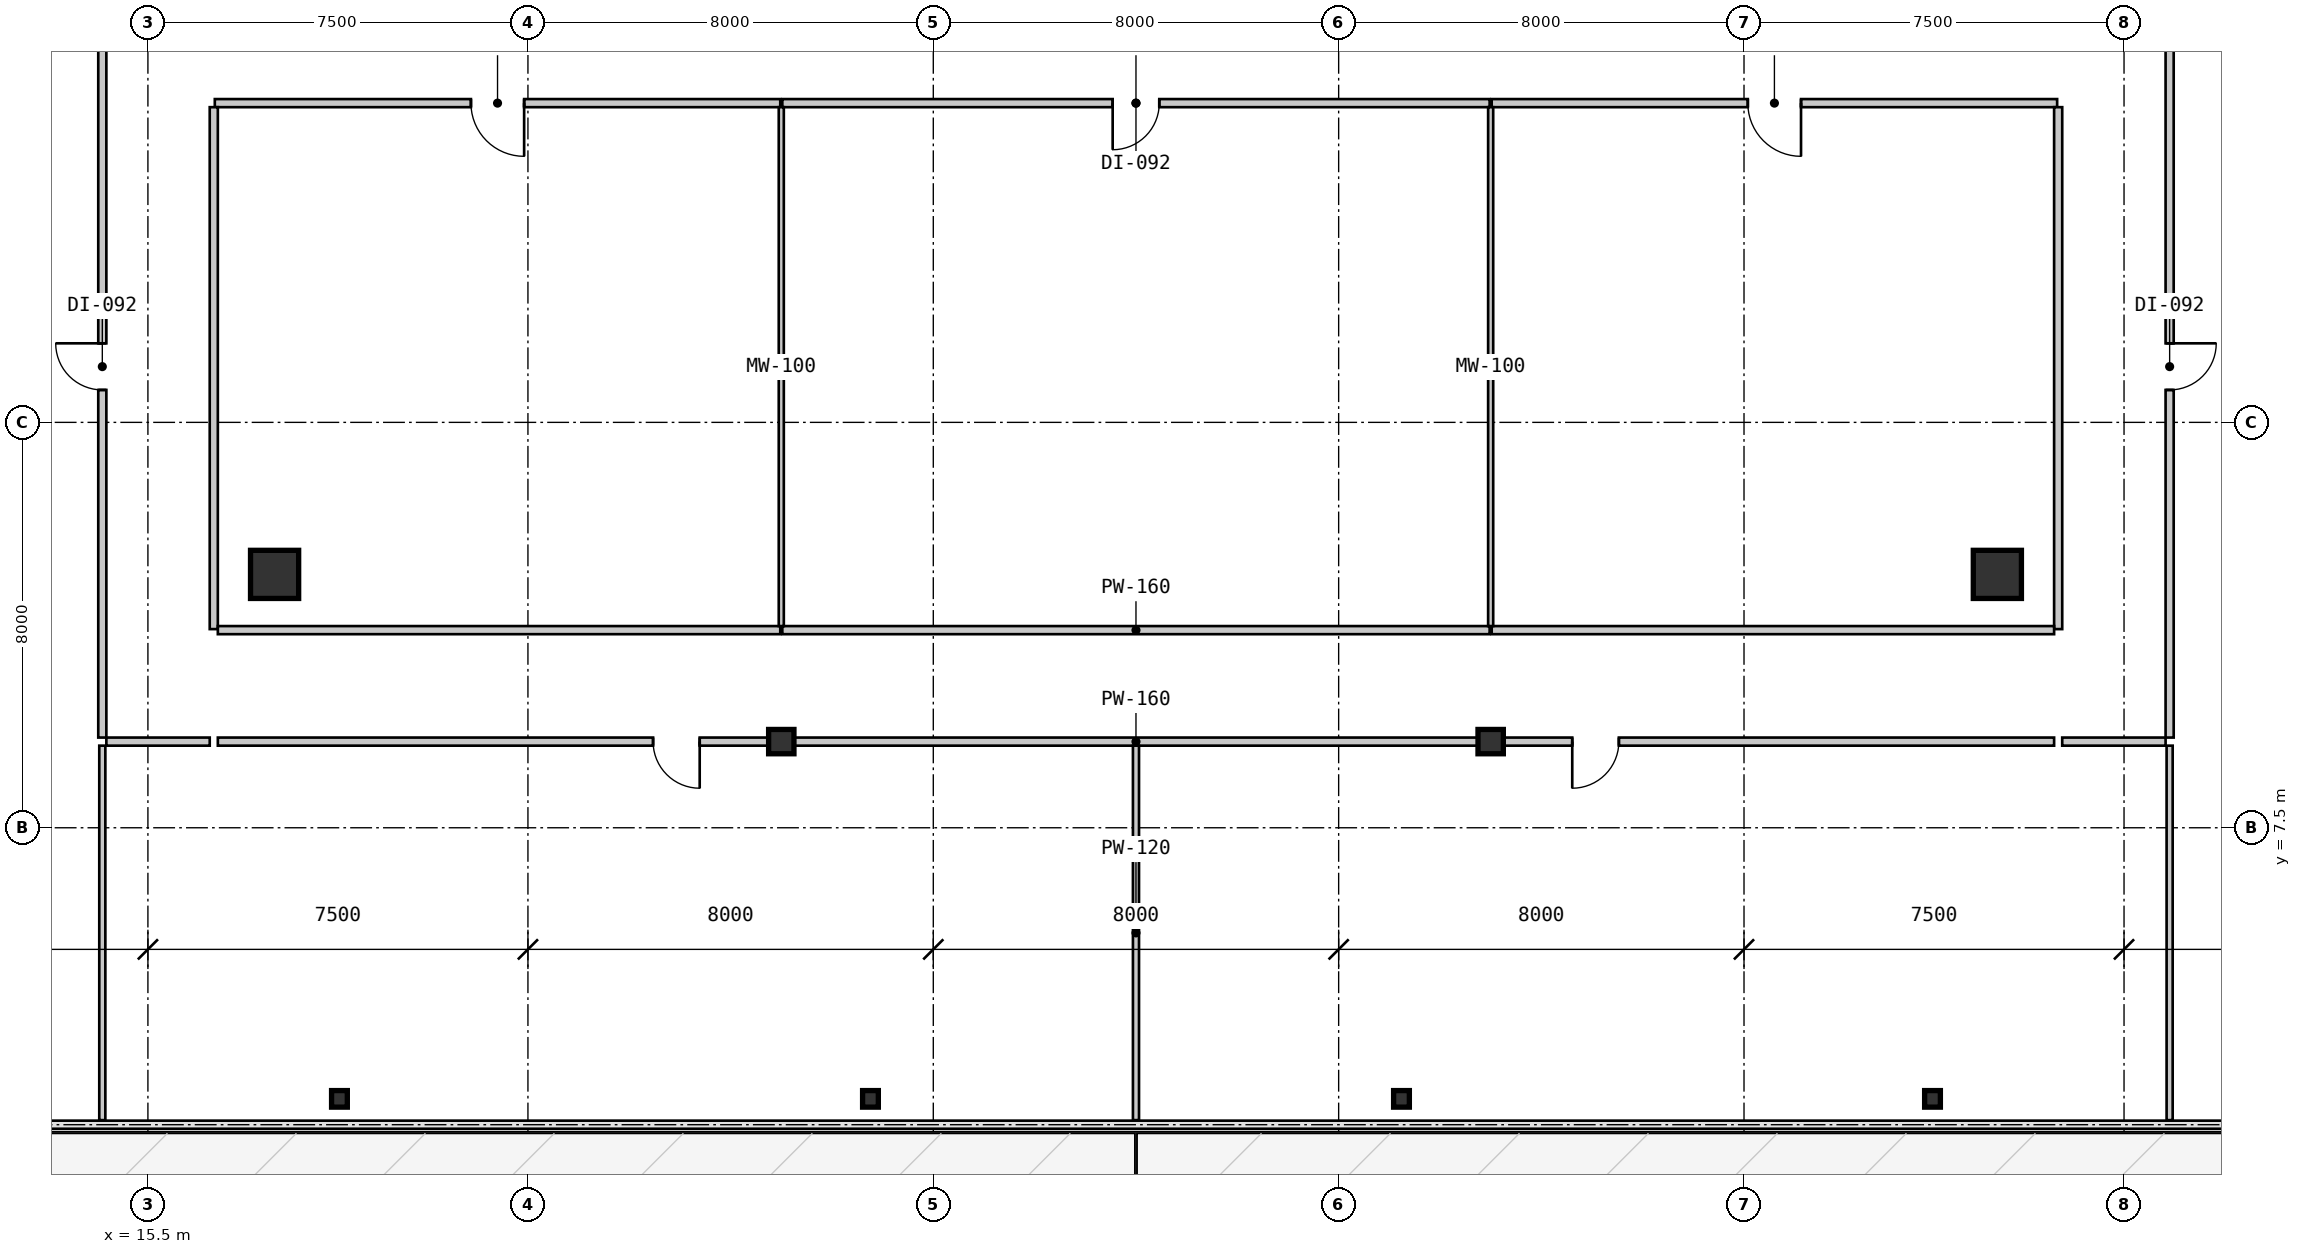
"""IFC4 building model, lengths in metres.
Left out: names, types, materials, properties, quantities, classifications, styles, units other than length and angle.
Written with IfcOpenShell. Run it as: python <this file> out.ifc"""

import sys

from ifc_helpers import new_model, si_unit, direction, frame, frame_2d, origin, origin_2d, place, context, subcontext, project, spatial, rectangle, i_section, extrude, source, transform, mapped, element, fill, save


model = new_model("IFC4")
c1 = context("Model", 3, precision=1e-05, world=origin(), true_north=direction((0.0, 1.0)))
c2 = subcontext(c1, "Body", "Model", "MODEL_VIEW")
j1 = project(units=[si_unit("LENGTHUNIT", "METRE"), si_unit("PLANEANGLEUNIT", "RADIAN")], contexts=[c1])
p1 = place(None, origin())
s1 = spatial("IfcSite", under=j1, at=p1, CompositionType="ELEMENT")
p2 = place(p1, origin())
s2 = spatial("IfcBuilding", under=s1, at=p2, CompositionType="ELEMENT")
p3 = place(p2, frame((0.0, 0.0, 16.8)))
s3 = spatial("IfcBuildingStorey", under=s2, at=p3, CompositionType="ELEMENT", Elevation=16.8)
m1 = source(origin(), c2, "Body", "SweptSolid", [
    extrude(i_section(OverallWidth=0.5, OverallDepth=0.48, WebThickness=0.028, FlangeThickness=0.044, at=origin_2d()), origin(), (0.0, 0.0, 1.0), 3.15),
])
for number, where, z_axis, x_axis in (
    (1, (28.0, 9.2, 0.0), (0.0, 0.0, 1.0), (1.0, 0.0, 0.0)),
    (2, (42.0, 9.2, 0.0), (0.0, 0.0, 1.0), (1.0, 0.0, 0.0)),
):
    element("IfcColumn", number, at=place(p3, frame(where, z_axis=z_axis, x_axis=x_axis)), inside=s3, PredefinedType="COLUMN", context=c2, shape_type="MappedRepresentation", body=[
        mapped(m1, transform((0.0, 0.0, 0.0), scale=1.0)),
    ])
m2 = source(origin(), c2, "Body", "SweptSolid", [
    extrude(rectangle(XDim=0.95, YDim=0.95, at=origin_2d()), origin(), (0.0, 0.0, 1.0), 3.15),
])
for number, where, z_axis, x_axis in (
    (3, (18.0, 12.5, 0.0), (0.0, 0.0, 1.0), (1.0, 0.0, 0.0)),
    (4, (52.0, 12.5, 0.0), (0.0, 0.0, 1.0), (1.0, 0.0, 0.0)),
):
    element("IfcColumn", number, at=place(p3, frame(where, z_axis=z_axis, x_axis=x_axis)), inside=s3, PredefinedType="COLUMN", context=c2, shape_type="MappedRepresentation", body=[
        mapped(m2, transform((0.0, 0.0, 0.0), scale=1.0)),
    ])
m3 = source(origin(), c2, "Body", "SweptSolid", [
    extrude(i_section(OverallWidth=0.311, OverallDepth=0.327, WebThickness=0.016, FlangeThickness=0.025, at=origin_2d()), origin(), (0.0, 0.0, 1.0), 3.15),
])
for number, where, z_axis, x_axis in (
    (5, (19.28, 2.15, 0.0), (0.0, 0.0, 1.0), (1.0, 0.0, 0.0)),
    (6, (29.76, 2.15, 0.0), (0.0, 0.0, 1.0), (1.0, 0.0, 0.0)),
    (7, (40.24, 2.15, 0.0), (0.0, 0.0, 1.0), (1.0, 0.0, 0.0)),
    (8, (50.72, 2.15, 0.0), (0.0, 0.0, 1.0), (1.0, 0.0, 0.0)),
):
    element("IfcColumn", number, at=place(p3, frame(where, z_axis=z_axis, x_axis=x_axis)), inside=s3, PredefinedType="COLUMN", context=c2, shape_type="MappedRepresentation", body=[
        mapped(m3, transform((0.0, 0.0, 0.0), scale=1.0)),
    ])
m4 = source(origin(), c2, "Body", "SweptSolid", [
    extrude(rectangle(XDim=11.159, YDim=0.16, at=frame_2d((5.58, 0.0))), origin(), (0.0, 0.0, 1.0), 2.93),
])
p4 = place(p3, frame((27.98, 21.8, 0.0), z_axis=(0.0, 0.0, 1.0), x_axis=(-1.0, 0.0, 0.0)))
e9 = element("IfcWall", 9, at=p4, inside=s3, PredefinedType="PARTITIONING", context=c2, shape_type="MappedRepresentation", body=[
    mapped(m4, transform((0.0, 0.0, 0.0), scale=1.0)),
])
m5 = source(origin(), c2, "Body", "SweptSolid", [
    extrude(rectangle(XDim=1.05, YDim=2.1, at=frame_2d((0.525, 1.05))), frame((0.0, 0.09, 0.0), z_axis=(0.0, -1.0, 0.0), x_axis=(1.0, 0.0, 0.0)), (0.0, 0.0, 1.0), 0.18),
])
p5 = place(p4, frame((5.055, 0.0, 0.0)))
e10 = element("IfcOpeningElement", 10, at=p5, cuts=e9, PredefinedType="OPENING", context=c2, shape_type="MappedRepresentation", body=[
    mapped(m5, transform((0.0, 0.0, 0.0), scale=1.0)),
])
m6 = source(origin(), c2, "Body", "SweptSolid", [
    extrude(rectangle(XDim=10.3, YDim=0.16, at=frame_2d((5.15, 0.0))), origin(), (0.0, 0.0, 1.0), 2.93),
])
p6 = place(p3, frame((16.8, 21.72, 0.0), z_axis=(0.0, 0.0, 1.0), x_axis=(0.0, -1.0, 0.0)))
e11 = element("IfcWall", 11, at=p6, inside=s3, PredefinedType="PARTITIONING", context=c2, shape_type="MappedRepresentation", body=[
    mapped(m6, transform((0.0, 0.0, 0.0), scale=1.0)),
])
m7 = source(origin(), c2, "Body", "SweptSolid", [
    extrude(rectangle(XDim=13.959, YDim=0.16, at=frame_2d((6.98, 0.0))), origin(), (0.0, 0.0, 1.0), 2.93),
])
p7 = place(p3, frame((41.98, 21.8, 0.0), z_axis=(0.0, 0.0, 1.0), x_axis=(-1.0, 0.0, 0.0)))
e12 = element("IfcWall", 12, at=p7, inside=s3, PredefinedType="PARTITIONING", context=c2, shape_type="MappedRepresentation", body=[
    mapped(m7, transform((0.0, 0.0, 0.0), scale=1.0)),
])
m8 = source(origin(), c2, "Body", "SweptSolid", [
    extrude(rectangle(XDim=0.92, YDim=2.1, at=frame_2d((0.46, 1.05))), frame((0.0, 0.09, 0.0), z_axis=(0.0, -1.0, 0.0), x_axis=(1.0, 0.0, 0.0)), (0.0, 0.0, 1.0), 0.18),
])
p8 = place(p7, frame((6.52, 0.0, 0.0)))
e13 = element("IfcOpeningElement", 13, at=p8, cuts=e12, PredefinedType="OPENING", context=c2, shape_type="MappedRepresentation", body=[
    mapped(m8, transform((0.0, 0.0, 0.0), scale=1.0)),
])
p9 = place(p3, frame((53.18, 21.8, 0.0), z_axis=(0.0, 0.0, 1.0), x_axis=(-1.0, 0.0, 0.0)))
e14 = element("IfcWall", 14, at=p9, inside=s3, PredefinedType="PARTITIONING", context=c2, shape_type="MappedRepresentation", body=[
    mapped(m4, transform((0.0, 0.0, 0.0), scale=1.0)),
])
p10 = place(p9, frame((5.055, 0.0, 0.0)))
e15 = element("IfcOpeningElement", 15, at=p10, cuts=e14, PredefinedType="OPENING", context=c2, shape_type="MappedRepresentation", body=[
    mapped(m5, transform((0.0, 0.0, 0.0), scale=1.0)),
])
p11 = place(p3, frame((53.2, 11.42, 0.0), z_axis=(0.0, 0.0, 1.0), x_axis=(0.0, 1.0, 0.0)))
e16 = element("IfcWall", 16, at=p11, inside=s3, PredefinedType="PARTITIONING", context=c2, shape_type="MappedRepresentation", body=[
    mapped(m6, transform((0.0, 0.0, 0.0), scale=1.0)),
])
m9 = source(origin(), c2, "Body", "SweptSolid", [
    extrude(rectangle(XDim=2.04, YDim=0.16, at=frame_2d((1.02, 0.0))), origin(), (0.0, 0.0, 1.0), 2.93),
])
for number, where, z_axis, x_axis in (
    (17, (16.72, 9.2, 0.0), (0.0, 0.0, 1.0), (-1.0, 0.0, 0.0)),
    (18, (55.32, 9.2, 0.0), (0.0, 0.0, 1.0), (-1.0, 0.0, 0.0)),
):
    element("IfcWall", number, at=place(p3, frame(where, z_axis=z_axis, x_axis=x_axis)), inside=s3, PredefinedType="PARTITIONING", context=c2, shape_type="MappedRepresentation", body=[
        mapped(m9, transform((0.0, 0.0, 0.0), scale=1.0)),
    ])
m10 = source(origin(), c2, "Body", "SweptSolid", [
    extrude(rectangle(XDim=14.64, YDim=0.16, at=frame_2d((7.32, 0.0))), origin(), (0.0, 0.0, 1.0), 2.93),
])
p12 = place(p3, frame((14.6, 9.28, 0.0), z_axis=(0.0, 0.0, 1.0), x_axis=(0.0, 1.0, 0.0)))
e19 = element("IfcWall", 19, at=p12, inside=s3, PredefinedType="PARTITIONING", context=c2, shape_type="MappedRepresentation", body=[
    mapped(m10, transform((0.0, 0.0, 0.0), scale=1.0)),
])
p13 = place(p12, frame((6.86, 0.0, 0.0)))
e20 = element("IfcOpeningElement", 20, at=p13, cuts=e19, PredefinedType="OPENING", context=c2, shape_type="MappedRepresentation", body=[
    mapped(m8, transform((0.0, 0.0, 0.0), scale=1.0)),
])
p14 = place(p3, frame((55.4, 23.92, 0.0), z_axis=(0.0, 0.0, 1.0), x_axis=(0.0, -1.0, 0.0)))
e21 = element("IfcWall", 21, at=p14, inside=s3, PredefinedType="PARTITIONING", context=c2, shape_type="MappedRepresentation", body=[
    mapped(m10, transform((0.0, 0.0, 0.0), scale=1.0)),
])
p15 = place(p14, frame((6.86, 0.0, 0.0)))
e22 = element("IfcOpeningElement", 22, at=p15, cuts=e21, PredefinedType="OPENING", context=c2, shape_type="MappedRepresentation", body=[
    mapped(m8, transform((0.0, 0.0, 0.0), scale=1.0)),
])
m11 = source(origin(), c2, "Body", "SweptSolid", [
    extrude(rectangle(XDim=11.1, YDim=0.16, at=frame_2d((5.55, 0.0))), origin(), (0.0, 0.0, 1.0), 2.93),
])
p16 = place(p3, frame((16.88, 11.4, 0.0), z_axis=(0.0, 0.0, 1.0), x_axis=(1.0, 0.0, 0.0)))
e23 = element("IfcWall", 23, at=p16, inside=s3, PredefinedType="PARTITIONING", context=c2, shape_type="MappedRepresentation", body=[
    mapped(m11, transform((0.0, 0.0, 0.0), scale=1.0)),
])
p17 = place(p3, frame((28.02, 11.4, 0.0), z_axis=(0.0, 0.0, 1.0), x_axis=(1.0, 0.0, 0.0)))
e24 = element("IfcWall", 24, at=p17, inside=s3, PredefinedType="PARTITIONING", context=c2, shape_type="MappedRepresentation", body=[
    mapped(m7, transform((0.0, 0.0, 0.0), scale=1.0)),
])
p18 = place(p3, frame((42.02, 11.4, 0.0), z_axis=(0.0, 0.0, 1.0), x_axis=(1.0, 0.0, 0.0)))
e25 = element("IfcWall", 25, at=p18, inside=s3, PredefinedType="PARTITIONING", context=c2, shape_type="MappedRepresentation", body=[
    mapped(m11, transform((0.0, 0.0, 0.0), scale=1.0)),
])
m12 = source(origin(), c2, "Body", "SweptSolid", [
    extrude(rectangle(XDim=6.98, YDim=0.16, at=frame_2d((3.49, 0.0))), origin(), (0.0, 0.0, 1.0), 2.328),
])
p19 = place(p3, frame((34.98, 9.2, 0.0), z_axis=(0.0, 0.0, 1.0), x_axis=(-1.0, 0.0, 0.0)))
e26 = element("IfcWall", 26, at=p19, inside=s3, PredefinedType="PARTITIONING", context=c2, shape_type="MappedRepresentation", body=[
    mapped(m12, transform((0.0, 0.0, 0.0), scale=1.0)),
])
m13 = source(origin(), c2, "Body", "SweptSolid", [
    extrude(rectangle(XDim=11.12, YDim=0.16, at=frame_2d((5.56, 0.0))), origin(), (0.0, 0.0, 1.0), 2.93),
])
p20 = place(p3, frame((28.0, 9.2, 0.0), z_axis=(0.0, 0.0, 1.0), x_axis=(-1.0, 0.0, 0.0)))
e27 = element("IfcWall", 27, at=p20, inside=s3, PredefinedType="PARTITIONING", context=c2, shape_type="MappedRepresentation", body=[
    mapped(m13, transform((0.0, 0.0, 0.0), scale=1.0)),
])
p21 = place(p20, frame((1.61, 0.0, 0.0)))
e28 = element("IfcOpeningElement", 28, at=p21, cuts=e27, PredefinedType="OPENING", context=c2, shape_type="MappedRepresentation", body=[
    mapped(m8, transform((0.0, 0.0, 0.0), scale=1.0)),
])
p22 = place(p3, frame((53.12, 9.2, 0.0), z_axis=(0.0, 0.0, 1.0), x_axis=(-1.0, 0.0, 0.0)))
e29 = element("IfcWall", 29, at=p22, inside=s3, PredefinedType="PARTITIONING", context=c2, shape_type="MappedRepresentation", body=[
    mapped(m13, transform((0.0, 0.0, 0.0), scale=1.0)),
])
p23 = place(p22, frame((8.59, 0.0, 0.0)))
e30 = element("IfcOpeningElement", 30, at=p23, cuts=e29, PredefinedType="OPENING", context=c2, shape_type="MappedRepresentation", body=[
    mapped(m8, transform((0.0, 0.0, 0.0), scale=1.0)),
])
p24 = place(p3, frame((42.0, 9.2, 0.0), z_axis=(0.0, 0.0, 1.0), x_axis=(-1.0, 0.0, 0.0)))
e31 = element("IfcWall", 31, at=p24, inside=s3, PredefinedType="PARTITIONING", context=c2, shape_type="MappedRepresentation", body=[
    mapped(m12, transform((0.0, 0.0, 0.0), scale=1.0)),
])
m14 = source(origin(), c2, "Body", "SweptSolid", [
    extrude(rectangle(XDim=10.24, YDim=0.1, at=frame_2d((5.12, 0.0))), origin(), (0.0, 0.0, 1.0), 2.328),
])
p25 = place(p3, frame((28.0, 21.72, 0.0), z_axis=(0.0, 0.0, 1.0), x_axis=(0.0, -1.0, 0.0)))
e32 = element("IfcWall", 32, at=p25, inside=s3, PredefinedType="MOVABLE", context=c2, shape_type="MappedRepresentation", body=[
    mapped(m14, transform((0.0, 0.0, 0.0), scale=1.0)),
])
m15 = source(origin(), c2, "Body", "SweptSolid", [
    extrude(rectangle(XDim=10.24, YDim=0.1, at=frame_2d((5.12, 0.0))), origin(), (0.0, 0.0, 1.0), 2.93),
])
p26 = place(p3, frame((42.0, 21.72, 0.0), z_axis=(0.0, 0.0, 1.0), x_axis=(0.0, -1.0, 0.0)))
e33 = element("IfcWall", 33, at=p26, inside=s3, PredefinedType="MOVABLE", context=c2, shape_type="MappedRepresentation", body=[
    mapped(m15, transform((0.0, 0.0, 0.0), scale=1.0)),
])
m16 = source(origin(), c2, "Body", "SweptSolid", [
    extrude(rectangle(XDim=7.39, YDim=0.12, at=frame_2d((3.695, 0.0))), origin(), (0.0, 0.0, 1.0), 2.93),
])
for number, where, z_axis, x_axis in (
    (34, (35.0, 9.12, 0.0), (0.0, 0.0, 1.0), (0.0, -1.0, 0.0)),
    (35, (14.6, 1.73, 0.0), (0.0, 0.0, 1.0), (0.0, 1.0, 0.0)),
    (36, (55.4, 9.12, 0.0), (0.0, 0.0, 1.0), (0.0, -1.0, 0.0)),
):
    element("IfcWall", number, at=place(p3, frame(where, z_axis=z_axis, x_axis=x_axis)), inside=s3, PredefinedType="PARTITIONING", context=c2, shape_type="MappedRepresentation", body=[
        mapped(m16, transform((0.0, 0.0, 0.0), scale=1.0)),
    ])
m17 = source(origin(), c2, "Body", "SweptSolid", [
    extrude(rectangle(XDim=1.05, YDim=2.1, at=frame_2d((0.525, 1.05))), frame((0.0, 0.025, 0.0), z_axis=(0.0, -1.0, 0.0), x_axis=(1.0, 0.0, 0.0)), (0.0, 0.0, 1.0), 0.05),
])
p27 = place(p5, origin())
e37 = element("IfcDoor", 37, at=p27, inside=s3, OperationType="SINGLE_SWING_LEFT", PredefinedType="DOOR", context=c2, shape_type="MappedRepresentation", body=[
    mapped(m17, transform((0.0, 0.0, 0.0), scale=1.0)),
])
fill(e10, e37)
m18 = source(origin(), c2, "Body", "SweptSolid", [
    extrude(rectangle(XDim=0.92, YDim=2.1, at=frame_2d((0.46, 1.05))), frame((0.0, 0.025, 0.0), z_axis=(0.0, -1.0, 0.0), x_axis=(1.0, 0.0, 0.0)), (0.0, 0.0, 1.0), 0.05),
])
p28 = place(p8, origin())
e38 = element("IfcDoor", 38, at=p28, inside=s3, OperationType="SINGLE_SWING_RIGHT", PredefinedType="DOOR", context=c2, shape_type="MappedRepresentation", body=[
    mapped(m18, transform((0.0, 0.0, 0.0), scale=1.0)),
])
fill(e13, e38)
p29 = place(p10, origin())
e39 = element("IfcDoor", 39, at=p29, inside=s3, OperationType="SINGLE_SWING_LEFT", PredefinedType="DOOR", context=c2, shape_type="MappedRepresentation", body=[
    mapped(m17, transform((0.0, 0.0, 0.0), scale=1.0)),
])
fill(e15, e39)
p30 = place(p13, origin())
e40 = element("IfcDoor", 40, at=p30, inside=s3, OperationType="SINGLE_SWING_RIGHT", PredefinedType="DOOR", context=c2, shape_type="MappedRepresentation", body=[
    mapped(m18, transform((0.0, 0.0, 0.0), scale=1.0)),
])
fill(e20, e40)
p31 = place(p15, origin())
e41 = element("IfcDoor", 41, at=p31, inside=s3, OperationType="SINGLE_SWING_LEFT", PredefinedType="DOOR", context=c2, shape_type="MappedRepresentation", body=[
    mapped(m18, transform((0.0, 0.0, 0.0), scale=1.0)),
])
fill(e22, e41)
p32 = place(p21, origin())
e42 = element("IfcDoor", 42, at=p32, inside=s3, OperationType="SINGLE_SWING_LEFT", PredefinedType="DOOR", context=c2, shape_type="MappedRepresentation", body=[
    mapped(m18, transform((0.0, 0.0, 0.0), scale=1.0)),
])
fill(e28, e42)
p33 = place(p23, origin())
e43 = element("IfcDoor", 43, at=p33, inside=s3, OperationType="SINGLE_SWING_RIGHT", PredefinedType="DOOR", context=c2, shape_type="MappedRepresentation", body=[
    mapped(m18, transform((0.0, 0.0, 0.0), scale=1.0)),
])
fill(e30, e43)
save(model, sys.argv[1])
